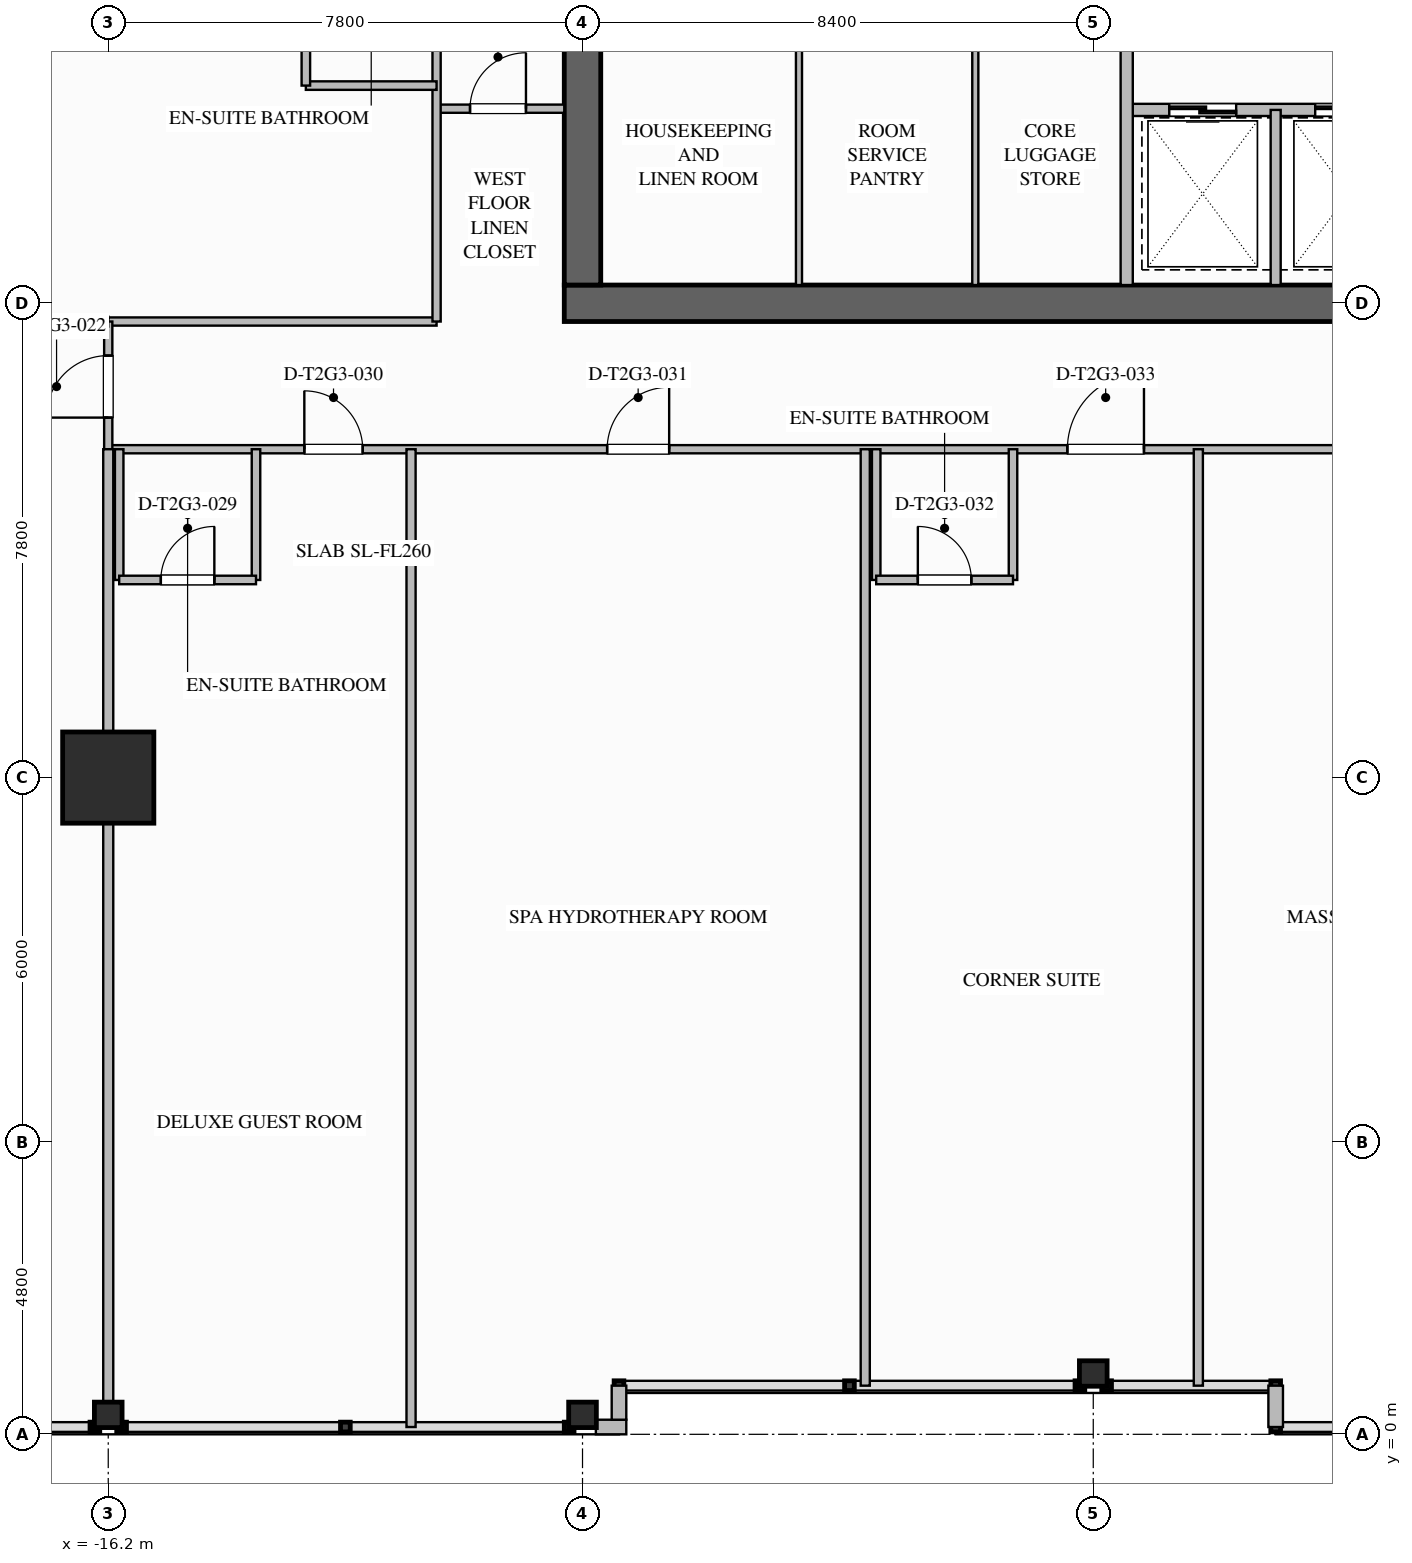
"""IFC4 building model, lengths in metres.
Left out: names, types, materials, properties, quantities, classifications, styles, units other than length and angle.
Written with IfcOpenShell. Run it as: python <this file> out.ifc"""

import sys

from ifc_helpers import new_model, si_unit, direction, frame, frame_2d, origin, origin_2d, place, context, subcontext, project, spatial, rectangle, i_section, extrude, element, fill, save


model = new_model("IFC4")
c1 = context("Model", 3, precision=1e-05, world=origin(), true_north=direction((0.0, 1.0)))
c2 = subcontext(c1, "Body", "Model", "MODEL_VIEW")
j1 = project(units=[si_unit("LENGTHUNIT", "METRE"), si_unit("PLANEANGLEUNIT", "RADIAN")], contexts=[c1])
p1 = place(None, origin())
s1 = spatial("IfcSite", under=j1, at=p1, CompositionType="ELEMENT")
p2 = place(p1, origin())
s2 = spatial("IfcBuilding", under=s1, at=p2, CompositionType="ELEMENT")
p3 = place(p2, frame((0.0, 0.0, 112.8)))
s3 = spatial("IfcBuildingStorey", under=s2, at=p3, CompositionType="ELEMENT", Elevation=112.8)
p4 = place(p3, frame((8.7, 18.6, 0.0), z_axis=(0.0, 0.0, 1.0), x_axis=(-1.0, 0.0, 0.0)))
e1 = element("IfcWall", 1, at=p4, inside=s3, PredefinedType="SHEAR", context=c2, shape_type="SweptSolid", body=[
    extrude(rectangle(XDim=17.4, YDim=0.6, at=frame_2d((8.7, 0.0))), origin(), (0.0, 0.0, 1.0), 3.5),
])
p5 = place(p3, frame((-8.4, 18.9, 0.0), z_axis=(0.0, 0.0, 1.0), x_axis=(0.0, 1.0, 0.0)))
e2 = element("IfcWall", 2, at=p5, inside=s3, PredefinedType="SHEAR", context=c2, shape_type="SweptSolid", body=[
    extrude(rectangle(XDim=16.2, YDim=0.6, at=frame_2d((8.1, 0.0))), origin(), (0.0, 0.0, 1.0), 3.5),
])
p6 = place(p5, frame((4.5, 0.0, 0.0)))
e3 = element("IfcOpeningElement", 3, at=p6, cuts=e2, PredefinedType="OPENING", context=c2, shape_type="SweptSolid", body=[
    extrude(rectangle(XDim=1.08, YDim=2.04, at=frame_2d((0.54, 1.02))), frame((0.0, 0.31, 0.0), z_axis=(0.0, -1.0, 0.0), x_axis=(1.0, 0.0, 0.0)), (0.0, 0.0, 1.0), 0.62),
])
p7 = place(p3, frame((-16.2, 10.8, 0.0), z_axis=(0.0, 0.0, 1.0), x_axis=(1.0, 0.0, 0.0)))
e4 = element("IfcColumn", 4, at=p7, inside=s3, PredefinedType="COLUMN", context=c2, shape_type="SweptSolid", body=[
    extrude(rectangle(XDim=1.5, YDim=1.5, at=origin_2d()), origin(), (0.0, 0.0, 1.0), 3.5),
])
for number, where, z_axis, x_axis in (
    (5, (-16.2, 0.32, 0.0), (0.0, 0.0, 1.0), (0.0, 1.0, 0.0)),
    (6, (-8.4, 0.32, 0.0), (0.0, 0.0, 1.0), (0.0, 1.0, 0.0)),
    (7, (0.0, 1.0, 0.0), (0.0, 0.0, 1.0), (0.0, 1.0, 0.0)),
):
    element("IfcColumn", number, at=place(p3, frame(where, z_axis=z_axis, x_axis=x_axis)), inside=s3, PredefinedType="COLUMN", context=c2, shape_type="SweptSolid", body=[
        extrude(i_section(OverallWidth=0.418, OverallDepth=0.455, WebThickness=0.042, FlangeThickness=0.068, FilletRadius=0.03, at=origin_2d()), origin(), (0.0, 0.0, 1.0), 3.497),
    ])
p8 = place(p3, frame((-7.68, 0.12, 0.0), z_axis=(0.0, 0.0, 1.0), x_axis=(-1.0, 0.0, 0.0)))
e8 = element("IfcWall", 8, at=p8, inside=s3, PredefinedType="STANDARD", context=c2, shape_type="SweptSolid", body=[
    extrude(rectangle(XDim=0.5, YDim=0.24, at=frame_2d((0.25, 0.0))), origin(), (0.0, 0.0, 1.0), 3.24),
])
p9 = place(p3, frame((3.0, 0.12, 0.0), z_axis=(0.0, 0.0, 1.0), x_axis=(0.0, 1.0, 0.0)))
e9 = element("IfcWall", 9, at=p9, inside=s3, PredefinedType="STANDARD", context=c2, shape_type="SweptSolid", body=[
    extrude(rectangle(XDim=0.68, YDim=0.24, at=frame_2d((0.34, 0.0))), origin(), (0.0, 0.0, 1.0), 3.24),
])
p10 = place(p3, frame((-7.8, 0.8, 0.0), z_axis=(0.0, 0.0, 1.0), x_axis=(0.0, -1.0, 0.0)))
e10 = element("IfcWall", 10, at=p10, inside=s3, PredefinedType="STANDARD", context=c2, shape_type="SweptSolid", body=[
    extrude(rectangle(XDim=0.56, YDim=0.24, at=frame_2d((0.28, 0.0))), origin(), (0.0, 0.0, 1.0), 3.24),
])
p11 = place(p3, frame((8.1, 21.78, 0.0), z_axis=(0.0, 0.0, 1.0), x_axis=(-1.0, 0.0, 0.0)))
e11 = element("IfcWall", 11, at=p11, inside=s3, PredefinedType="SOLIDWALL", context=c2, shape_type="SweptSolid", body=[
    extrude(rectangle(XDim=7.55, YDim=0.2, at=frame_2d((3.775, 0.0))), origin(), (0.0, 0.0, 1.0), 3.24),
])
p12 = place(p11, frame((5.75, 0.0, 0.0)))
e12 = element("IfcOpeningElement", 12, at=p12, cuts=e11, PredefinedType="OPENING", context=c2, shape_type="SweptSolid", body=[
    extrude(rectangle(XDim=1.1, YDim=2.2, at=frame_2d((0.55, 1.1))), frame((0.0, 0.11, 0.0), z_axis=(0.0, -1.0, 0.0), x_axis=(1.0, 0.0, 0.0)), (0.0, 0.0, 1.0), 0.22),
])
p13 = place(p11, frame((3.35, 0.0, 0.0)))
e13 = element("IfcOpeningElement", 13, at=p13, cuts=e11, PredefinedType="OPENING", context=c2, shape_type="SweptSolid", body=[
    extrude(rectangle(XDim=1.1, YDim=2.2, at=frame_2d((0.55, 1.1))), frame((0.0, 0.11, 0.0), z_axis=(0.0, -1.0, 0.0), x_axis=(1.0, 0.0, 0.0)), (0.0, 0.0, 1.0), 0.22),
])
p14 = place(p11, frame((0.95, 0.0, 0.0)))
e14 = element("IfcOpeningElement", 14, at=p14, cuts=e11, PredefinedType="OPENING", context=c2, shape_type="SweptSolid", body=[
    extrude(rectangle(XDim=1.1, YDim=2.2, at=frame_2d((0.55, 1.1))), frame((0.0, 0.11, 0.0), z_axis=(0.0, -1.0, 0.0), x_axis=(1.0, 0.0, 0.0)), (0.0, 0.0, 1.0), 0.22),
])
p15 = place(p3, frame((0.55, 18.9, 0.0), z_axis=(0.0, 0.0, 1.0), x_axis=(0.0, 1.0, 0.0)))
e15 = element("IfcWall", 15, at=p15, inside=s3, PredefinedType="SOLIDWALL", context=c2, shape_type="SweptSolid", body=[
    extrude(rectangle(XDim=4.3, YDim=0.2, at=frame_2d((2.15, 0.0))), origin(), (0.0, 0.0, 1.0), 3.24),
])
p16 = place(p3, frame((3.0, 18.9, 0.0), z_axis=(0.0, 0.0, 1.0), x_axis=(0.0, 1.0, 0.0)))
e16 = element("IfcWall", 16, at=p16, inside=s3, PredefinedType="PARTITIONING", context=c2, shape_type="SweptSolid", body=[
    extrude(rectangle(XDim=2.88, YDim=0.165, at=frame_2d((1.44, 0.0))), origin(), (0.0, 0.0, 1.0), 3.24),
])
for number, where, z_axis, x_axis in (
    (17, (-4.84, 18.9, 0.0), (0.0, 0.0, 1.0), (0.0, 1.0, 0.0)),
    (18, (-1.94, 18.9, 0.0), (0.0, 0.0, 1.0), (0.0, 1.0, 0.0)),
):
    element("IfcWall", number, at=place(p3, frame(where, z_axis=z_axis, x_axis=x_axis)), inside=s3, PredefinedType="PARTITIONING", context=c2, shape_type="SweptSolid", body=[
        extrude(rectangle(XDim=4.3, YDim=0.1, at=frame_2d((2.15, 0.0))), origin(), (0.0, 0.0, 1.0), 3.24),
    ])
p17 = place(p3, frame((-10.8, 21.8, 0.0), z_axis=(0.0, 0.0, 1.0), x_axis=(1.0, 0.0, 0.0)))
e19 = element("IfcWall", 19, at=p17, inside=s3, PredefinedType="PARTITIONING", context=c2, shape_type="SweptSolid", body=[
    extrude(rectangle(XDim=2.1, YDim=0.135, at=frame_2d((1.05, 0.0))), origin(), (0.0, 0.0, 1.0), 3.24),
])
p18 = place(p17, frame((0.55, 0.0, 0.0)))
e20 = element("IfcOpeningElement", 20, at=p18, cuts=e19, PredefinedType="OPENING", context=c2, shape_type="SweptSolid", body=[
    extrude(rectangle(XDim=0.92, YDim=2.1, at=frame_2d((0.46, 1.05))), frame((0.0, 0.077, 0.0), z_axis=(0.0, -1.0, 0.0), x_axis=(1.0, 0.0, 0.0)), (0.0, 0.0, 1.0), 0.155),
])
p19 = place(p3, frame((-16.2, 18.3, 0.0), z_axis=(0.0, 0.0, 1.0), x_axis=(1.0, 0.0, 0.0)))
e21 = element("IfcWall", 21, at=p19, inside=s3, PredefinedType="PARTITIONING", context=c2, shape_type="SweptSolid", body=[
    extrude(rectangle(XDim=5.4, YDim=0.135, at=frame_2d((2.7, 0.0))), origin(), (0.0, 0.0, 1.0), 3.24),
])
p20 = place(p3, frame((-16.2, 16.2, 0.0), z_axis=(0.0, 0.0, 1.0), x_axis=(1.0, 0.0, 0.0)))
e22 = element("IfcWall", 22, at=p20, inside=s3, PredefinedType="PARTITIONING", context=c2, shape_type="SweptSolid", body=[
    extrude(rectangle(XDim=24.9, YDim=0.135, at=frame_2d((12.45, 0.0))), origin(), (0.0, 0.0, 1.0), 3.24),
])
p21 = place(p20, frame((3.225, 0.0, 0.0)))
e23 = element("IfcOpeningElement", 23, at=p21, cuts=e22, PredefinedType="OPENING", context=c2, shape_type="SweptSolid", body=[
    extrude(rectangle(XDim=0.96, YDim=2.15, at=frame_2d((0.48, 1.075))), frame((0.0, 0.077, 0.0), z_axis=(0.0, -1.0, 0.0), x_axis=(1.0, 0.0, 0.0)), (0.0, 0.0, 1.0), 0.155),
])
p22 = place(p20, frame((8.205, 0.0, 0.0)))
e24 = element("IfcOpeningElement", 24, at=p22, cuts=e22, PredefinedType="OPENING", context=c2, shape_type="SweptSolid", body=[
    extrude(rectangle(XDim=1.02, YDim=2.15, at=frame_2d((0.51, 1.075))), frame((0.0, 0.077, 0.0), z_axis=(0.0, -1.0, 0.0), x_axis=(1.0, 0.0, 0.0)), (0.0, 0.0, 1.0), 0.155),
])
p23 = place(p20, frame((15.774, 0.0, 0.0)))
e25 = element("IfcOpeningElement", 25, at=p23, cuts=e22, PredefinedType="OPENING", context=c2, shape_type="SweptSolid", body=[
    extrude(rectangle(XDim=1.26, YDim=2.2, at=frame_2d((0.63, 1.1))), frame((0.0, 0.077, 0.0), z_axis=(0.0, -1.0, 0.0), x_axis=(1.0, 0.0, 0.0)), (0.0, 0.0, 1.0), 0.155),
])
p24 = place(p20, frame((20.904, 0.0, 0.0)))
e26 = element("IfcOpeningElement", 26, at=p24, cuts=e22, PredefinedType="OPENING", context=c2, shape_type="SweptSolid", body=[
    extrude(rectangle(XDim=1.02, YDim=2.15, at=frame_2d((0.51, 1.075))), frame((0.0, 0.077, 0.0), z_axis=(0.0, -1.0, 0.0), x_axis=(1.0, 0.0, 0.0)), (0.0, 0.0, 1.0), 0.155),
])
p25 = place(p3, frame((-10.8, 18.3, 0.0), z_axis=(0.0, 0.0, 1.0), x_axis=(0.0, 1.0, 0.0)))
e27 = element("IfcWall", 27, at=p25, inside=s3, PredefinedType="PARTITIONING", context=c2, shape_type="SweptSolid", body=[
    extrude(rectangle(XDim=17.4, YDim=0.135, at=frame_2d((8.7, 0.0))), origin(), (0.0, 0.0, 1.0), 3.24),
])
p26 = place(p25, frame((6.785, 0.0, 0.0)))
e28 = element("IfcOpeningElement", 28, at=p26, cuts=e27, PredefinedType="OPENING", context=c2, shape_type="SweptSolid", body=[
    extrude(rectangle(XDim=1.26, YDim=2.2, at=frame_2d((0.63, 1.1))), frame((0.0, 0.077, 0.0), z_axis=(0.0, -1.0, 0.0), x_axis=(1.0, 0.0, 0.0)), (0.0, 0.0, 1.0), 0.155),
])
p27 = place(p25, frame((9.355, 0.0, 0.0)))
e29 = element("IfcOpeningElement", 29, at=p27, cuts=e27, PredefinedType="OPENING", context=c2, shape_type="SweptSolid", body=[
    extrude(rectangle(XDim=1.26, YDim=2.2, at=frame_2d((0.63, 1.1))), frame((0.0, 0.077, 0.0), z_axis=(0.0, -1.0, 0.0), x_axis=(1.0, 0.0, 0.0)), (0.0, 0.0, 1.0), 0.155),
])
p28 = place(p3, frame((-16.2, 16.2, 0.0), z_axis=(0.0, 0.0, 1.0), x_axis=(0.0, 1.0, 0.0)))
e30 = element("IfcWall", 30, at=p28, inside=s3, PredefinedType="PARTITIONING", context=c2, shape_type="SweptSolid", body=[
    extrude(rectangle(XDim=2.1, YDim=0.135, at=frame_2d((1.05, 0.0))), origin(), (0.0, 0.0, 1.0), 2.452),
])
p29 = place(p28, frame((0.52, 0.0, 0.0)))
e31 = element("IfcOpeningElement", 31, at=p29, cuts=e30, PredefinedType="OPENING", context=c2, shape_type="SweptSolid", body=[
    extrude(rectangle(XDim=1.02, YDim=2.15, at=frame_2d((0.51, 1.075))), frame((0.0, 0.077, 0.0), z_axis=(0.0, -1.0, 0.0), x_axis=(1.0, 0.0, 0.0)), (0.0, 0.0, 1.0), 0.155),
])
p30 = place(p3, frame((-16.2, 0.12, 0.0), z_axis=(0.0, 0.0, 1.0), x_axis=(0.0, 1.0, 0.0)))
e32 = element("IfcWall", 32, at=p30, inside=s3, PredefinedType="PARTITIONING", context=c2, shape_type="SweptSolid", body=[
    extrude(rectangle(XDim=16.08, YDim=0.165, at=frame_2d((8.04, 0.0))), origin(), (0.0, 0.0, 1.0), 2.452),
])
p31 = place(p3, frame((-26.88, 18.3, 0.0), z_axis=(0.0, 0.0, 1.0), x_axis=(1.0, 0.0, 0.0)))
e33 = element("IfcWall", 33, at=p31, inside=s3, PredefinedType="PARTITIONING", context=c2, shape_type="SweptSolid", body=[
    extrude(rectangle(XDim=10.68, YDim=0.165, at=frame_2d((5.34, 0.0))), origin(), (0.0, 0.0, 1.0), 2.452),
])
p32 = place(p3, frame((-16.02, 16.2, 0.0), z_axis=(0.0, 0.0, 1.0), x_axis=(0.0, -1.0, 0.0)))
e34 = element("IfcWall", 34, at=p32, inside=s3, PredefinedType="PLUMBINGWALL", context=c2, shape_type="SweptSolid", body=[
    extrude(rectangle(XDim=2.15, YDim=0.14, at=frame_2d((1.075, 0.0))), origin(), (0.0, 0.0, 1.0), 2.452),
])
p33 = place(p3, frame((-13.77, 16.2, 0.0), z_axis=(0.0, 0.0, 1.0), x_axis=(0.0, -1.0, 0.0)))
e35 = element("IfcWall", 35, at=p33, inside=s3, PredefinedType="PLUMBINGWALL", context=c2, shape_type="SweptSolid", body=[
    extrude(rectangle(XDim=2.15, YDim=0.14, at=frame_2d((1.075, 0.0))), origin(), (0.0, 0.0, 1.0), 3.24),
])
p34 = place(p3, frame((-16.02, 14.05, 0.0), z_axis=(0.0, 0.0, 1.0), x_axis=(1.0, 0.0, 0.0)))
e36 = element("IfcWall", 36, at=p34, inside=s3, PredefinedType="PLUMBINGWALL", context=c2, shape_type="SweptSolid", body=[
    extrude(rectangle(XDim=2.25, YDim=0.14, at=frame_2d((1.125, 0.0))), origin(), (0.0, 0.0, 1.0), 3.24),
])
p35 = place(p34, frame((0.685, 0.0, 0.0)))
e37 = element("IfcOpeningElement", 37, at=p35, cuts=e36, PredefinedType="OPENING", context=c2, shape_type="SweptSolid", body=[
    extrude(rectangle(XDim=0.88, YDim=2.1, at=frame_2d((0.44, 1.05))), frame((0.0, 0.08, 0.0), z_axis=(0.0, -1.0, 0.0), x_axis=(1.0, 0.0, 0.0)), (0.0, 0.0, 1.0), 0.16),
])
p36 = place(p3, frame((-11.22, 0.12, 0.0), z_axis=(0.0, 0.0, 1.0), x_axis=(0.0, 1.0, 0.0)))
e38 = element("IfcWall", 38, at=p36, inside=s3, PredefinedType="PARTITIONING", context=c2, shape_type="SweptSolid", body=[
    extrude(rectangle(XDim=16.08, YDim=0.15, at=frame_2d((8.04, 0.0))), origin(), (0.0, 0.0, 1.0), 3.24),
])
p37 = place(p3, frame((-3.75, 0.8, 0.0), z_axis=(0.0, 0.0, 1.0), x_axis=(0.0, 1.0, 0.0)))
e39 = element("IfcWall", 39, at=p37, inside=s3, PredefinedType="PARTITIONING", context=c2, shape_type="SweptSolid", body=[
    extrude(rectangle(XDim=15.4, YDim=0.15, at=frame_2d((7.7, 0.0))), origin(), (0.0, 0.0, 1.0), 3.24),
])
for number, where, z_axis, x_axis in (
    (40, (-3.57, 16.2, 0.0), (0.0, 0.0, 1.0), (0.0, -1.0, 0.0)),
    (41, (-1.32, 16.2, 0.0), (0.0, 0.0, 1.0), (0.0, -1.0, 0.0)),
):
    element("IfcWall", number, at=place(p3, frame(where, z_axis=z_axis, x_axis=x_axis)), inside=s3, PredefinedType="PLUMBINGWALL", context=c2, shape_type="SweptSolid", body=[
        extrude(rectangle(XDim=2.15, YDim=0.14, at=frame_2d((1.075, 0.0))), origin(), (0.0, 0.0, 1.0), 3.24),
    ])
p38 = place(p3, frame((-3.57, 14.05, 0.0), z_axis=(0.0, 0.0, 1.0), x_axis=(1.0, 0.0, 0.0)))
e42 = element("IfcWall", 42, at=p38, inside=s3, PredefinedType="PLUMBINGWALL", context=c2, shape_type="SweptSolid", body=[
    extrude(rectangle(XDim=2.25, YDim=0.14, at=frame_2d((1.125, 0.0))), origin(), (0.0, 0.0, 1.0), 3.24),
])
p39 = place(p38, frame((0.685, 0.0, 0.0)))
e43 = element("IfcOpeningElement", 43, at=p39, cuts=e42, PredefinedType="OPENING", context=c2, shape_type="SweptSolid", body=[
    extrude(rectangle(XDim=0.88, YDim=2.1, at=frame_2d((0.44, 1.05))), frame((0.0, 0.08, 0.0), z_axis=(0.0, -1.0, 0.0), x_axis=(1.0, 0.0, 0.0)), (0.0, 0.0, 1.0), 0.16),
])
p40 = place(p3, frame((1.728, 0.8, 0.0), z_axis=(0.0, 0.0, 1.0), x_axis=(0.0, 1.0, 0.0)))
e44 = element("IfcWall", 44, at=p40, inside=s3, PredefinedType="PARTITIONING", context=c2, shape_type="SweptSolid", body=[
    extrude(rectangle(XDim=15.4, YDim=0.15, at=frame_2d((7.7, 0.0))), origin(), (0.0, 0.0, 1.0), 3.24),
])
p41 = place(p3, frame((-10.8, 22.18, 0.0), z_axis=(0.0, 0.0, 1.0), x_axis=(-1.0, 0.0, 0.0)))
e45 = element("IfcWall", 45, at=p41, inside=s3, PredefinedType="PLUMBINGWALL", context=c2, shape_type="SweptSolid", body=[
    extrude(rectangle(XDim=2.15, YDim=0.14, at=frame_2d((1.075, 0.0))), origin(), (0.0, 0.0, 1.0), 3.24),
])
p42 = place(p3, frame((-12.95, 22.18, 0.0), z_axis=(0.0, 0.0, 1.0), x_axis=(0.0, 1.0, 0.0)))
e46 = element("IfcWall", 46, at=p42, inside=s3, PredefinedType="PLUMBINGWALL", context=c2, shape_type="SweptSolid", body=[
    extrude(rectangle(XDim=2.25, YDim=0.14, at=frame_2d((1.125, 0.0))), origin(), (0.0, 0.0, 1.0), 3.24),
])
p43 = place(p42, frame((0.685, 0.0, 0.0)))
e47 = element("IfcOpeningElement", 47, at=p43, cuts=e46, PredefinedType="OPENING", context=c2, shape_type="SweptSolid", body=[
    extrude(rectangle(XDim=0.88, YDim=2.1, at=frame_2d((0.44, 1.05))), frame((0.0, 0.08, 0.0), z_axis=(0.0, -1.0, 0.0), x_axis=(1.0, 0.0, 0.0)), (0.0, 0.0, 1.0), 0.16),
])
p44 = place(p12, origin())
e48 = element("IfcDoor", 48, at=p44, inside=s3, OperationType="SLIDING_TO_LEFT", PredefinedType="DOOR", context=c2, shape_type="SweptSolid", body=[
    extrude(rectangle(XDim=1.1, YDim=2.2, at=frame_2d((0.55, 1.1))), frame((0.0, 0.025, 0.0), z_axis=(0.0, -1.0, 0.0), x_axis=(1.0, 0.0, 0.0)), (0.0, 0.0, 1.0), 0.05),
])
fill(e12, e48)
p45 = place(p13, origin())
e49 = element("IfcDoor", 49, at=p45, inside=s3, OperationType="SLIDING_TO_LEFT", PredefinedType="DOOR", context=c2, shape_type="SweptSolid", body=[
    extrude(rectangle(XDim=1.1, YDim=2.2, at=frame_2d((0.55, 1.1))), frame((0.0, 0.025, 0.0), z_axis=(0.0, -1.0, 0.0), x_axis=(1.0, 0.0, 0.0)), (0.0, 0.0, 1.0), 0.05),
])
fill(e13, e49)
p46 = place(p18, origin())
e50 = element("IfcDoor", 50, at=p46, inside=s3, OperationType="SINGLE_SWING_RIGHT", PredefinedType="DOOR", context=c2, shape_type="SweptSolid", body=[
    extrude(rectangle(XDim=0.92, YDim=2.1, at=frame_2d((0.46, 1.05))), frame((0.0, 0.025, 0.0), z_axis=(0.0, -1.0, 0.0), x_axis=(1.0, 0.0, 0.0)), (0.0, 0.0, 1.0), 0.05),
])
fill(e20, e50)
p47 = place(p29, origin())
e51 = element("IfcDoor", 51, at=p47, inside=s3, OperationType="SINGLE_SWING_LEFT", PredefinedType="DOOR", context=c2, shape_type="SweptSolid", body=[
    extrude(rectangle(XDim=1.02, YDim=2.15, at=frame_2d((0.51, 1.075))), frame((0.0, 0.025, 0.0), z_axis=(0.0, -1.0, 0.0), x_axis=(1.0, 0.0, 0.0)), (0.0, 0.0, 1.0), 0.05),
])
fill(e31, e51)
p48 = place(p35, origin())
e52 = element("IfcDoor", 52, at=p48, inside=s3, OperationType="SINGLE_SWING_RIGHT", PredefinedType="DOOR", context=c2, shape_type="SweptSolid", body=[
    extrude(rectangle(XDim=0.88, YDim=2.1, at=frame_2d((0.44, 1.05))), frame((0.0, 0.025, 0.0), z_axis=(0.0, -1.0, 0.0), x_axis=(1.0, 0.0, 0.0)), (0.0, 0.0, 1.0), 0.05),
])
fill(e37, e52)
p49 = place(p21, origin())
e53 = element("IfcDoor", 53, at=p49, inside=s3, OperationType="SINGLE_SWING_LEFT", PredefinedType="DOOR", context=c2, shape_type="SweptSolid", body=[
    extrude(rectangle(XDim=0.96, YDim=2.15, at=frame_2d((0.48, 1.075))), frame((0.0, 0.025, 0.0), z_axis=(0.0, -1.0, 0.0), x_axis=(1.0, 0.0, 0.0)), (0.0, 0.0, 1.0), 0.05),
])
fill(e23, e53)
p50 = place(p22, origin())
e54 = element("IfcDoor", 54, at=p50, inside=s3, OperationType="SINGLE_SWING_RIGHT", PredefinedType="DOOR", context=c2, shape_type="SweptSolid", body=[
    extrude(rectangle(XDim=1.02, YDim=2.15, at=frame_2d((0.51, 1.075))), frame((0.0, 0.025, 0.0), z_axis=(0.0, -1.0, 0.0), x_axis=(1.0, 0.0, 0.0)), (0.0, 0.0, 1.0), 0.05),
])
fill(e24, e54)
p51 = place(p39, origin())
e55 = element("IfcDoor", 55, at=p51, inside=s3, OperationType="SINGLE_SWING_LEFT", PredefinedType="DOOR", context=c2, shape_type="SweptSolid", body=[
    extrude(rectangle(XDim=0.88, YDim=2.1, at=frame_2d((0.44, 1.05))), frame((0.0, 0.025, 0.0), z_axis=(0.0, -1.0, 0.0), x_axis=(1.0, 0.0, 0.0)), (0.0, 0.0, 1.0), 0.05),
])
fill(e43, e55)
p52 = place(p23, origin())
e56 = element("IfcDoor", 56, at=p52, inside=s3, OperationType="SINGLE_SWING_RIGHT", PredefinedType="DOOR", context=c2, shape_type="SweptSolid", body=[
    extrude(rectangle(XDim=1.26, YDim=2.2, at=frame_2d((0.63, 1.1))), frame((0.0, 0.025, 0.0), z_axis=(0.0, -1.0, 0.0), x_axis=(1.0, 0.0, 0.0)), (0.0, 0.0, 1.0), 0.05),
])
fill(e25, e56)
save(model, sys.argv[1])
